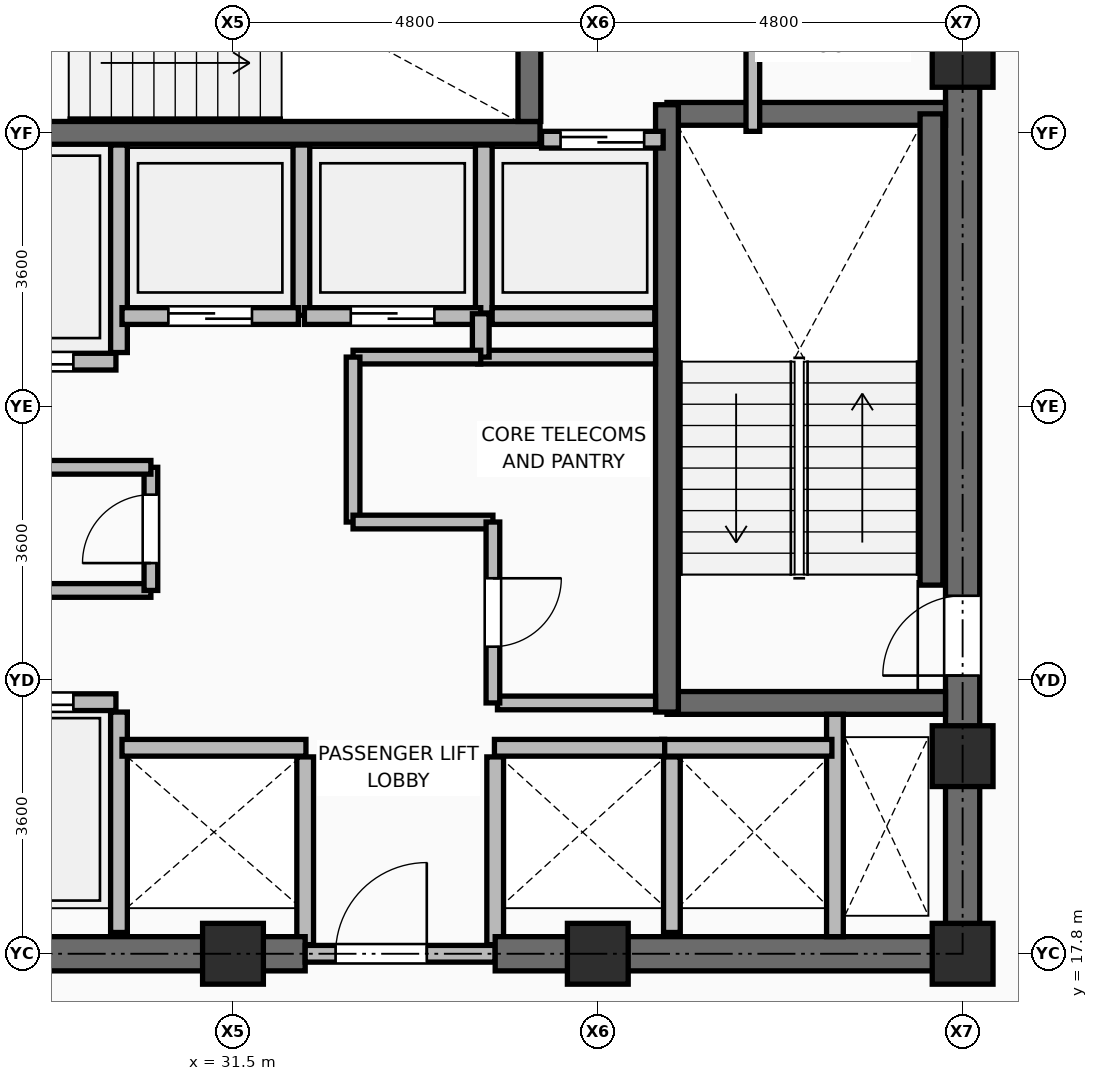
"""IFC4 building model, lengths in metres.
Left out: names, types, materials, properties, quantities, classifications, styles, units other than length and angle.
Written with IfcOpenShell. Run it as: python <this file> out.ifc"""

import sys

from ifc_helpers import new_model, si_unit, direction, frame, frame_2d, origin, origin_2d, place, context, subcontext, project, spatial, rectangle, extrude, element, fill, save


model = new_model("IFC4")
c1 = context("Model", 3, precision=1e-05, world=origin(), true_north=direction((0.0, 1.0)))
c2 = subcontext(c1, "Body", "Model", "MODEL_VIEW")
j1 = project(units=[si_unit("LENGTHUNIT", "METRE"), si_unit("PLANEANGLEUNIT", "RADIAN")], contexts=[c1])
p1 = place(None, origin())
s1 = spatial("IfcSite", under=j1, at=p1, CompositionType="ELEMENT")
p2 = place(p1, origin())
s2 = spatial("IfcBuilding", under=s1, at=p2, CompositionType="ELEMENT")
p3 = place(p2, frame((0.0, 0.0, 212.4)))
s3 = spatial("IfcBuildingStorey", under=s2, at=p3, CompositionType="ELEMENT", Elevation=212.4)
for number, where, z_axis, x_axis in (
    (1, (31.5, 17.8, 0.0), (0.0, 0.0, 1.0), (1.0, 0.0, 0.0)),
    (2, (36.3, 17.8, 0.0), (0.0, 0.0, 1.0), (1.0, 0.0, 0.0)),
    (3, (41.1, 17.8, 0.0), (0.0, 0.0, 1.0), (1.0, 0.0, 0.0)),
    (4, (41.1, 20.4, 0.0), (0.0, 0.0, 1.0), (1.0, 0.0, 0.0)),
    (5, (41.1, 29.6, 0.0), (0.0, 0.0, 1.0), (1.0, 0.0, 0.0)),
):
    element("IfcColumn", number, at=place(p3, frame(where, z_axis=z_axis, x_axis=x_axis)), inside=s3, PredefinedType="COLUMN", context=c2, shape_type="SweptSolid", body=[
        extrude(rectangle(XDim=0.8, YDim=0.8, at=origin_2d()), origin(), (0.0, 0.0, 1.0), 3.75),
    ])
p4 = place(p3, frame((30.0, 18.08, 0.0), z_axis=(0.0, 0.0, 1.0), x_axis=(0.0, 1.0, 0.0)))
e6 = element("IfcWall", 6, at=p4, inside=s3, PredefinedType="PARTITIONING", context=c2, shape_type="SweptSolid", body=[
    extrude(rectangle(XDim=2.9, YDim=0.22, at=frame_2d((1.45, 0.0))), origin(), (0.0, 0.0, 1.0), 3.545),
])
for number, where, z_axis, x_axis in (
    (7, (32.45, 17.92, 0.0), (0.0, 0.0, 1.0), (0.0, 1.0, 0.0)),
    (8, (34.95, 17.92, 0.0), (0.0, 0.0, 1.0), (0.0, 1.0, 0.0)),
):
    element("IfcWall", number, at=place(p3, frame(where, z_axis=z_axis, x_axis=x_axis)), inside=s3, PredefinedType="PARTITIONING", context=c2, shape_type="SweptSolid", body=[
        extrude(rectangle(XDim=2.47, YDim=0.22, at=frame_2d((1.235, 0.0))), origin(), (0.0, 0.0, 1.0), 3.545),
    ])
p5 = place(p3, frame((37.275, 18.08, 0.0), z_axis=(0.0, 0.0, 1.0), x_axis=(0.0, 1.0, 0.0)))
e9 = element("IfcWall", 9, at=p5, inside=s3, PredefinedType="PARTITIONING", context=c2, shape_type="SweptSolid", body=[
    extrude(rectangle(XDim=2.31, YDim=0.22, at=frame_2d((1.155, 0.0))), origin(), (0.0, 0.0, 1.0), 3.545),
])
p6 = place(p3, frame((30.0, 25.71, 0.0), z_axis=(0.0, 0.0, 1.0), x_axis=(0.0, 1.0, 0.0)))
e10 = element("IfcWall", 10, at=p6, inside=s3, PredefinedType="PARTITIONING", context=c2, shape_type="SweptSolid", body=[
    extrude(rectangle(XDim=2.73, YDim=0.22, at=frame_2d((1.365, 0.0))), origin(), (0.0, 0.0, 1.0), 3.545),
])
p7 = place(p3, frame((32.4, 26.2, 0.0), z_axis=(0.0, 0.0, 1.0), x_axis=(0.0, 1.0, 0.0)))
e11 = element("IfcWall", 11, at=p7, inside=s3, PredefinedType="PARTITIONING", context=c2, shape_type="SweptSolid", body=[
    extrude(rectangle(XDim=2.24, YDim=0.22, at=frame_2d((1.12, 0.0))), origin(), (0.0, 0.0, 1.0), 3.545),
])
p8 = place(p3, frame((34.8, 26.23, 0.0), z_axis=(0.0, 0.0, 1.0), x_axis=(0.0, 1.0, 0.0)))
e12 = element("IfcWall", 12, at=p8, inside=s3, PredefinedType="PARTITIONING", context=c2, shape_type="SweptSolid", body=[
    extrude(rectangle(XDim=2.21, YDim=0.22, at=frame_2d((1.105, 0.0))), origin(), (0.0, 0.0, 1.0), 3.545),
])
p9 = place(p3, frame((34.91, 26.19, 0.0), z_axis=(0.0, 0.0, 1.0), x_axis=(1.0, 0.0, 0.0)))
e13 = element("IfcWall", 13, at=p9, inside=s3, PredefinedType="PARTITIONING", context=c2, shape_type="SweptSolid", body=[
    extrude(rectangle(XDim=2.14, YDim=0.22, at=frame_2d((1.07, 0.0))), origin(), (0.0, 0.0, 1.0), 3.545),
])
p10 = place(p3, frame((25.55, 17.8, 0.0), z_axis=(0.0, 0.0, 1.0), x_axis=(1.0, 0.0, 0.0)))
e14 = element("IfcWall", 14, at=p10, inside=s3, PredefinedType="SHEAR", context=c2, shape_type="SweptSolid", body=[
    extrude(rectangle(XDim=6.9, YDim=0.45, at=frame_2d((3.45, 0.0))), origin(), (0.0, 0.0, 1.0), 3.57),
])
p11 = place(p3, frame((32.45, 17.8, 0.0), z_axis=(0.0, 0.0, 1.0), x_axis=(1.0, 0.0, 0.0)))
e15 = element("IfcWall", 15, at=p11, inside=s3, PredefinedType="PARTITIONING", context=c2, shape_type="SweptSolid", body=[
    extrude(rectangle(XDim=2.5, YDim=0.22, at=frame_2d((1.25, 0.0))), origin(), (0.0, 0.0, 1.0), 3.081),
])
p12 = place(p11, frame((0.4, 0.0, 0.0)))
e16 = element("IfcOpeningElement", 16, at=p12, cuts=e15, PredefinedType="OPENING", context=c2, shape_type="SweptSolid", body=[
    extrude(rectangle(XDim=1.2, YDim=2.1, at=frame_2d((0.6, 1.05))), frame((0.0, 0.12, 0.0), z_axis=(0.0, -1.0, 0.0), x_axis=(1.0, 0.0, 0.0)), (0.0, 0.0, 1.0), 0.24),
])
p13 = place(p3, frame((34.95, 17.8, 0.0), z_axis=(0.0, 0.0, 1.0), x_axis=(1.0, 0.0, 0.0)))
e17 = element("IfcWall", 17, at=p13, inside=s3, PredefinedType="SHEAR", context=c2, shape_type="SweptSolid", body=[
    extrude(rectangle(XDim=6.375, YDim=0.45, at=frame_2d((3.188, 0.0))), origin(), (0.0, 0.0, 1.0), 3.57),
])
p14 = place(p3, frame((41.1, 18.025, 0.0), z_axis=(0.0, 0.0, 1.0), x_axis=(0.0, 1.0, 0.0)))
e18 = element("IfcWall", 18, at=p14, inside=s3, PredefinedType="SHEAR", context=c2, shape_type="SweptSolid", body=[
    extrude(rectangle(XDim=14.2, YDim=0.45, at=frame_2d((7.1, 0.0))), origin(), (0.0, 0.0, 1.0), 3.57),
])
p15 = place(p14, frame((3.435, 0.0, 0.0)))
e19 = element("IfcOpeningElement", 19, at=p15, cuts=e18, PredefinedType="OPENING", context=c2, shape_type="SweptSolid", body=[
    extrude(rectangle(XDim=1.05, YDim=2.1, at=frame_2d((0.525, 1.05))), frame((0.0, 0.235, 0.0), z_axis=(0.0, -1.0, 0.0), x_axis=(1.0, 0.0, 0.0)), (0.0, 0.0, 1.0), 0.47),
])
for number, where, z_axis, x_axis in (
    (20, (37.21, 21.1, 0.0), (0.0, 0.0, 1.0), (1.0, 0.0, 0.0)),
    (21, (37.21, 28.85, 0.0), (0.0, 0.0, 1.0), (1.0, 0.0, 0.0)),
):
    element("IfcWall", number, at=place(p3, frame(where, z_axis=z_axis, x_axis=x_axis)), inside=s3, PredefinedType="SHEAR", context=c2, shape_type="SweptSolid", body=[
        extrude(rectangle(XDim=3.665, YDim=0.3, at=frame_2d((1.833, 0.0))), origin(), (0.0, 0.0, 1.0), 3.57),
    ])
p16 = place(p3, frame((37.21, 20.98, 0.0), z_axis=(0.0, 0.0, 1.0), x_axis=(0.0, 1.0, 0.0)))
e22 = element("IfcWall", 22, at=p16, inside=s3, PredefinedType="SHEAR", context=c2, shape_type="SweptSolid", body=[
    extrude(rectangle(XDim=7.99, YDim=0.3, at=frame_2d((3.995, 0.0))), origin(), (0.0, 0.0, 1.0), 3.57),
])
p17 = place(p3, frame((40.69, 22.65, 0.0), z_axis=(0.0, 0.0, 1.0), x_axis=(0.0, 1.0, 0.0)))
e23 = element("IfcWall", 23, at=p17, inside=s3, PredefinedType="SHEAR", context=c2, shape_type="SweptSolid", body=[
    extrude(rectangle(XDim=6.2, YDim=0.3, at=frame_2d((3.1, 0.0))), origin(), (0.0, 0.0, 1.0), 3.57),
])
p18 = place(p3, frame((27.51, 28.6, 0.0), z_axis=(0.0, 0.0, 1.0), x_axis=(1.0, 0.0, 0.0)))
e24 = element("IfcWall", 24, at=p18, inside=s3, PredefinedType="SHEAR", context=c2, shape_type="SweptSolid", body=[
    extrude(rectangle(XDim=8.03, YDim=0.3, at=frame_2d((4.015, 0.0))), origin(), (0.0, 0.0, 1.0), 3.57),
])
p19 = place(p3, frame((35.4, 28.75, 0.0), z_axis=(0.0, 0.0, 1.0), x_axis=(0.0, 1.0, 0.0)))
e25 = element("IfcWall", 25, at=p19, inside=s3, PredefinedType="SHEAR", context=c2, shape_type="SweptSolid", body=[
    extrude(rectangle(XDim=3.475, YDim=0.3, at=frame_2d((1.738, 0.0))), origin(), (0.0, 0.0, 1.0), 3.57),
])
p20 = place(p3, frame((39.42, 18.025, 0.0), z_axis=(0.0, 0.0, 1.0), x_axis=(0.0, 1.0, 0.0)))
e26 = element("IfcWall", 26, at=p20, inside=s3, PredefinedType="PARTITIONING", context=c2, shape_type="SweptSolid", body=[
    extrude(rectangle(XDim=2.925, YDim=0.22, at=frame_2d((1.462, 0.0))), origin(), (0.0, 0.0, 1.0), 3.55),
])
p21 = place(p3, frame((27.74, 21.11, 0.0), z_axis=(0.0, 0.0, 1.0), x_axis=(1.0, 0.0, 0.0)))
e27 = element("IfcWall", 27, at=p21, inside=s3, PredefinedType="PARTITIONING", context=c2, shape_type="SweptSolid", body=[
    extrude(rectangle(XDim=2.22, YDim=0.22, at=frame_2d((1.11, 0.0))), origin(), (0.0, 0.0, 1.0), 3.55),
])
p22 = place(p21, frame((0.56, 0.0, 0.0)))
e28 = element("IfcOpeningElement", 28, at=p22, cuts=e27, PredefinedType="OPENING", context=c2, shape_type="SweptSolid", body=[
    extrude(rectangle(XDim=1.1, YDim=2.2, at=frame_2d((0.55, 1.1))), frame((0.0, 0.12, 0.0), z_axis=(0.0, -1.0, 0.0), x_axis=(1.0, 0.0, 0.0)), (0.0, 0.0, 1.0), 0.24),
])
p23 = place(p3, frame((27.74, 25.59, 0.0), z_axis=(0.0, 0.0, 1.0), x_axis=(1.0, 0.0, 0.0)))
e29 = element("IfcWall", 29, at=p23, inside=s3, PredefinedType="PARTITIONING", context=c2, shape_type="SweptSolid", body=[
    extrude(rectangle(XDim=2.22, YDim=0.22, at=frame_2d((1.11, 0.0))), origin(), (0.0, 0.0, 1.0), 3.55),
])
p24 = place(p23, frame((0.56, 0.0, 0.0)))
e30 = element("IfcOpeningElement", 30, at=p24, cuts=e29, PredefinedType="OPENING", context=c2, shape_type="SweptSolid", body=[
    extrude(rectangle(XDim=1.1, YDim=2.2, at=frame_2d((0.55, 1.1))), frame((0.0, 0.12, 0.0), z_axis=(0.0, -1.0, 0.0), x_axis=(1.0, 0.0, 0.0)), (0.0, 0.0, 1.0), 0.24),
])
p25 = place(p3, frame((30.04, 20.51, 0.0), z_axis=(0.0, 0.0, 1.0), x_axis=(1.0, 0.0, 0.0)))
e31 = element("IfcWall", 31, at=p25, inside=s3, PredefinedType="PARTITIONING", context=c2, shape_type="SweptSolid", body=[
    extrude(rectangle(XDim=2.42, YDim=0.22, at=frame_2d((1.21, 0.0))), origin(), (0.0, 0.0, 1.0), 3.55),
])
for number, where, z_axis, x_axis in (
    (32, (37.14, 20.51, 0.0), (0.0, 0.0, 1.0), (1.0, 0.0, 0.0)),
    (33, (34.94, 20.51, 0.0), (0.0, 0.0, 1.0), (1.0, 0.0, 0.0)),
):
    element("IfcWall", number, at=place(p3, frame(where, z_axis=z_axis, x_axis=x_axis)), inside=s3, PredefinedType="PARTITIONING", context=c2, shape_type="SweptSolid", body=[
        extrude(rectangle(XDim=2.24, YDim=0.22, at=frame_2d((1.12, 0.0))), origin(), (0.0, 0.0, 1.0), 3.55),
    ])
p26 = place(p3, frame((30.04, 26.19, 0.0), z_axis=(0.0, 0.0, 1.0), x_axis=(1.0, 0.0, 0.0)))
e34 = element("IfcWall", 34, at=p26, inside=s3, PredefinedType="PARTITIONING", context=c2, shape_type="SweptSolid", body=[
    extrude(rectangle(XDim=2.32, YDim=0.22, at=frame_2d((1.16, 0.0))), origin(), (0.0, 0.0, 1.0), 3.55),
])
p27 = place(p26, frame((0.61, 0.0, 0.0)))
e35 = element("IfcOpeningElement", 35, at=p27, cuts=e34, PredefinedType="OPENING", context=c2, shape_type="SweptSolid", body=[
    extrude(rectangle(XDim=1.1, YDim=2.2, at=frame_2d((0.55, 1.1))), frame((0.0, 0.12, 0.0), z_axis=(0.0, -1.0, 0.0), x_axis=(1.0, 0.0, 0.0)), (0.0, 0.0, 1.0), 0.24),
])
p28 = place(p3, frame((32.44, 26.19, 0.0), z_axis=(0.0, 0.0, 1.0), x_axis=(1.0, 0.0, 0.0)))
e36 = element("IfcWall", 36, at=p28, inside=s3, PredefinedType="PARTITIONING", context=c2, shape_type="SweptSolid", body=[
    extrude(rectangle(XDim=2.32, YDim=0.22, at=frame_2d((1.16, 0.0))), origin(), (0.0, 0.0, 1.0), 3.55),
])
p29 = place(p28, frame((0.61, 0.0, 0.0)))
e37 = element("IfcOpeningElement", 37, at=p29, cuts=e36, PredefinedType="OPENING", context=c2, shape_type="SweptSolid", body=[
    extrude(rectangle(XDim=1.1, YDim=2.2, at=frame_2d((0.55, 1.1))), frame((0.0, 0.12, 0.0), z_axis=(0.0, -1.0, 0.0), x_axis=(1.0, 0.0, 0.0)), (0.0, 0.0, 1.0), 0.24),
])
p30 = place(p3, frame((35.56, 28.51, 0.0), z_axis=(0.0, 0.0, 1.0), x_axis=(1.0, 0.0, 0.0)))
e38 = element("IfcWall", 38, at=p30, inside=s3, PredefinedType="PARTITIONING", context=c2, shape_type="SweptSolid", body=[
    extrude(rectangle(XDim=1.6, YDim=0.22, at=frame_2d((0.8, 0.0))), origin(), (0.0, 0.0, 1.0), 3.55),
])
p31 = place(p30, frame((0.25, 0.0, 0.0)))
e39 = element("IfcOpeningElement", 39, at=p31, cuts=e38, PredefinedType="OPENING", context=c2, shape_type="SweptSolid", body=[
    extrude(rectangle(XDim=1.1, YDim=2.2, at=frame_2d((0.55, 1.1))), frame((0.0, 0.12, 0.0), z_axis=(0.0, -1.0, 0.0), x_axis=(1.0, 0.0, 0.0)), (0.0, 0.0, 1.0), 0.24),
])
p32 = place(p3, frame((27.68, 22.58, 0.0), z_axis=(0.0, 0.0, 1.0), x_axis=(1.0, 0.0, 0.0)))
e40 = element("IfcWall", 40, at=p32, inside=s3, PredefinedType="PARTITIONING", context=c2, shape_type="SweptSolid", body=[
    extrude(rectangle(XDim=2.74, YDim=0.18, at=frame_2d((1.37, 0.0))), origin(), (0.0, 0.0, 1.0), 3.55),
])
p33 = place(p3, frame((30.42, 22.58, 0.0), z_axis=(0.0, 0.0, 1.0), x_axis=(0.0, 1.0, 0.0)))
e41 = element("IfcWall", 41, at=p33, inside=s3, PredefinedType="PARTITIONING", context=c2, shape_type="SweptSolid", body=[
    extrude(rectangle(XDim=1.62, YDim=0.18, at=frame_2d((0.81, 0.0))), origin(), (0.0, 0.0, 1.0), 3.55),
])
p34 = place(p33, frame((0.36, 0.0, 0.0)))
e42 = element("IfcOpeningElement", 42, at=p34, cuts=e41, PredefinedType="OPENING", context=c2, shape_type="SweptSolid", body=[
    extrude(rectangle(XDim=0.9, YDim=2.1, at=frame_2d((0.45, 1.05))), frame((0.0, 0.1, 0.0), z_axis=(0.0, -1.0, 0.0), x_axis=(1.0, 0.0, 0.0)), (0.0, 0.0, 1.0), 0.2),
])
p35 = place(p3, frame((27.68, 24.2, 0.0), z_axis=(0.0, 0.0, 1.0), x_axis=(1.0, 0.0, 0.0)))
e43 = element("IfcWall", 43, at=p35, inside=s3, PredefinedType="PARTITIONING", context=c2, shape_type="SweptSolid", body=[
    extrude(rectangle(XDim=2.74, YDim=0.18, at=frame_2d((1.37, 0.0))), origin(), (0.0, 0.0, 1.0), 3.55),
])
p36 = place(p3, frame((34.98, 21.1, 0.0), z_axis=(0.0, 0.0, 1.0), x_axis=(1.0, 0.0, 0.0)))
e44 = element("IfcWall", 44, at=p36, inside=s3, PredefinedType="PARTITIONING", context=c2, shape_type="SweptSolid", body=[
    extrude(rectangle(XDim=2.08, YDim=0.18, at=frame_2d((1.04, 0.0))), origin(), (0.0, 0.0, 1.0), 3.55),
])
p37 = place(p3, frame((34.72, 25.65, 0.0), z_axis=(0.0, 0.0, 1.0), x_axis=(1.0, 0.0, 0.0)))
e45 = element("IfcWall", 45, at=p37, inside=s3, PredefinedType="PARTITIONING", context=c2, shape_type="SweptSolid", body=[
    extrude(rectangle(XDim=2.34, YDim=0.18, at=frame_2d((1.17, 0.0))), origin(), (0.0, 0.0, 1.0), 3.55),
])
p38 = place(p3, frame((34.76, 25.65, 0.0), z_axis=(0.0, 0.0, 1.0), x_axis=(0.0, 1.0, 0.0)))
e46 = element("IfcWall", 46, at=p38, inside=s3, PredefinedType="PARTITIONING", context=c2, shape_type="SweptSolid", body=[
    extrude(rectangle(XDim=0.57, YDim=0.22, at=frame_2d((0.285, 0.0))), origin(), (0.0, 0.0, 1.0), 3.55),
])
p39 = place(p3, frame((33.08, 25.65, 0.0), z_axis=(0.0, 0.0, 1.0), x_axis=(1.0, 0.0, 0.0)))
e47 = element("IfcWall", 47, at=p39, inside=s3, PredefinedType="PARTITIONING", context=c2, shape_type="SweptSolid", body=[
    extrude(rectangle(XDim=1.68, YDim=0.18, at=frame_2d((0.84, 0.0))), origin(), (0.0, 0.0, 1.0), 3.55),
])
p40 = place(p3, frame((33.08, 23.48, 0.0), z_axis=(0.0, 0.0, 1.0), x_axis=(0.0, 1.0, 0.0)))
e48 = element("IfcWall", 48, at=p40, inside=s3, PredefinedType="PARTITIONING", context=c2, shape_type="SweptSolid", body=[
    extrude(rectangle(XDim=2.17, YDim=0.18, at=frame_2d((1.085, 0.0))), origin(), (0.0, 0.0, 1.0), 3.55),
])
p41 = place(p3, frame((33.08, 23.48, 0.0), z_axis=(0.0, 0.0, 1.0), x_axis=(1.0, 0.0, 0.0)))
e49 = element("IfcWall", 49, at=p41, inside=s3, PredefinedType="PARTITIONING", context=c2, shape_type="SweptSolid", body=[
    extrude(rectangle(XDim=1.84, YDim=0.18, at=frame_2d((0.92, 0.0))), origin(), (0.0, 0.0, 1.0), 3.55),
])
p42 = place(p3, frame((34.92, 21.1, 0.0), z_axis=(0.0, 0.0, 1.0), x_axis=(0.0, 1.0, 0.0)))
e50 = element("IfcWall", 50, at=p42, inside=s3, PredefinedType="PARTITIONING", context=c2, shape_type="SweptSolid", body=[
    extrude(rectangle(XDim=2.38, YDim=0.18, at=frame_2d((1.19, 0.0))), origin(), (0.0, 0.0, 1.0), 3.55),
])
p43 = place(p42, frame((0.74, 0.0, 0.0)))
e51 = element("IfcOpeningElement", 51, at=p43, cuts=e50, PredefinedType="OPENING", context=c2, shape_type="SweptSolid", body=[
    extrude(rectangle(XDim=0.9, YDim=2.1, at=frame_2d((0.45, 1.05))), frame((0.0, 0.1, 0.0), z_axis=(0.0, -1.0, 0.0), x_axis=(1.0, 0.0, 0.0)), (0.0, 0.0, 1.0), 0.2),
])
p44 = place(p3, frame((38.34, 28.62, 0.0), z_axis=(0.0, 0.0, 1.0), x_axis=(0.0, 1.0, 0.0)))
e52 = element("IfcWall", 52, at=p44, inside=s3, PredefinedType="PARTITIONING", context=c2, shape_type="SweptSolid", body=[
    extrude(rectangle(XDim=3.605, YDim=0.18, at=frame_2d((1.802, 0.0))), origin(), (0.0, 0.0, 1.0), 3.55),
])
p45 = place(p12, origin())
e53 = element("IfcDoor", 53, at=p45, inside=s3, OperationType="SINGLE_SWING_RIGHT", PredefinedType="DOOR", context=c2, shape_type="SweptSolid", body=[
    extrude(rectangle(XDim=1.2, YDim=2.1, at=frame_2d((0.6, 1.05))), frame((0.0, 0.025, 0.0), z_axis=(0.0, -1.0, 0.0), x_axis=(1.0, 0.0, 0.0)), (0.0, 0.0, 1.0), 0.05),
])
fill(e16, e53)
p46 = place(p15, origin())
e54 = element("IfcDoor", 54, at=p46, inside=s3, OperationType="SINGLE_SWING_LEFT", PredefinedType="DOOR", context=c2, shape_type="SweptSolid", body=[
    extrude(rectangle(XDim=1.05, YDim=2.1, at=frame_2d((0.525, 1.05))), frame((0.0, 0.025, 0.0), z_axis=(0.0, -1.0, 0.0), x_axis=(1.0, 0.0, 0.0)), (0.0, 0.0, 1.0), 0.05),
])
fill(e19, e54)
p47 = place(p22, origin())
e55 = element("IfcDoor", 55, at=p47, inside=s3, OperationType="DOUBLE_DOOR_SLIDING", PredefinedType="DOOR", context=c2, shape_type="SweptSolid", body=[
    extrude(rectangle(XDim=1.1, YDim=2.2, at=frame_2d((0.55, 1.1))), frame((0.0, 0.025, 0.0), z_axis=(0.0, -1.0, 0.0), x_axis=(1.0, 0.0, 0.0)), (0.0, 0.0, 1.0), 0.05),
])
fill(e28, e55)
p48 = place(p24, frame((1.1, 0.0, 0.0), z_axis=(0.0, 0.0, 1.0), x_axis=(-1.0, 0.0, 0.0)))
e56 = element("IfcDoor", 56, at=p48, inside=s3, OperationType="DOUBLE_DOOR_SLIDING", PredefinedType="DOOR", context=c2, shape_type="SweptSolid", body=[
    extrude(rectangle(XDim=1.1, YDim=2.2, at=frame_2d((0.55, 1.1))), frame((0.0, 0.025, 0.0), z_axis=(0.0, -1.0, 0.0), x_axis=(1.0, 0.0, 0.0)), (0.0, 0.0, 1.0), 0.05),
])
fill(e30, e56)
p49 = place(p27, frame((1.1, 0.0, 0.0), z_axis=(0.0, 0.0, 1.0), x_axis=(-1.0, 0.0, 0.0)))
e57 = element("IfcDoor", 57, at=p49, inside=s3, OperationType="DOUBLE_DOOR_SLIDING", PredefinedType="DOOR", context=c2, shape_type="SweptSolid", body=[
    extrude(rectangle(XDim=1.1, YDim=2.2, at=frame_2d((0.55, 1.1))), frame((0.0, 0.025, 0.0), z_axis=(0.0, -1.0, 0.0), x_axis=(1.0, 0.0, 0.0)), (0.0, 0.0, 1.0), 0.05),
])
fill(e35, e57)
p50 = place(p29, frame((1.1, 0.0, 0.0), z_axis=(0.0, 0.0, 1.0), x_axis=(-1.0, 0.0, 0.0)))
e58 = element("IfcDoor", 58, at=p50, inside=s3, OperationType="DOUBLE_DOOR_SLIDING", PredefinedType="DOOR", context=c2, shape_type="SweptSolid", body=[
    extrude(rectangle(XDim=1.1, YDim=2.2, at=frame_2d((0.55, 1.1))), frame((0.0, 0.025, 0.0), z_axis=(0.0, -1.0, 0.0), x_axis=(1.0, 0.0, 0.0)), (0.0, 0.0, 1.0), 0.05),
])
fill(e37, e58)
p51 = place(p31, origin())
e59 = element("IfcDoor", 59, at=p51, inside=s3, OperationType="DOUBLE_DOOR_SLIDING", PredefinedType="DOOR", context=c2, shape_type="SweptSolid", body=[
    extrude(rectangle(XDim=1.1, YDim=2.2, at=frame_2d((0.55, 1.1))), frame((0.0, 0.025, 0.0), z_axis=(0.0, -1.0, 0.0), x_axis=(1.0, 0.0, 0.0)), (0.0, 0.0, 1.0), 0.05),
])
fill(e39, e59)
p52 = place(p34, origin())
e60 = element("IfcDoor", 60, at=p52, inside=s3, OperationType="SINGLE_SWING_LEFT", PredefinedType="DOOR", context=c2, shape_type="SweptSolid", body=[
    extrude(rectangle(XDim=0.9, YDim=2.1, at=frame_2d((0.45, 1.05))), frame((0.0, 0.025, 0.0), z_axis=(0.0, -1.0, 0.0), x_axis=(1.0, 0.0, 0.0)), (0.0, 0.0, 1.0), 0.05),
])
fill(e42, e60)
p53 = place(p43, frame((0.9, 0.0, 0.0), z_axis=(0.0, 0.0, 1.0), x_axis=(-1.0, 0.0, 0.0)))
e61 = element("IfcDoor", 61, at=p53, inside=s3, OperationType="SINGLE_SWING_LEFT", PredefinedType="DOOR", context=c2, shape_type="SweptSolid", body=[
    extrude(rectangle(XDim=0.9, YDim=2.1, at=frame_2d((0.45, 1.05))), frame((0.0, 0.025, 0.0), z_axis=(0.0, -1.0, 0.0), x_axis=(1.0, 0.0, 0.0)), (0.0, 0.0, 1.0), 0.05),
])
fill(e51, e61)
save(model, sys.argv[1])
